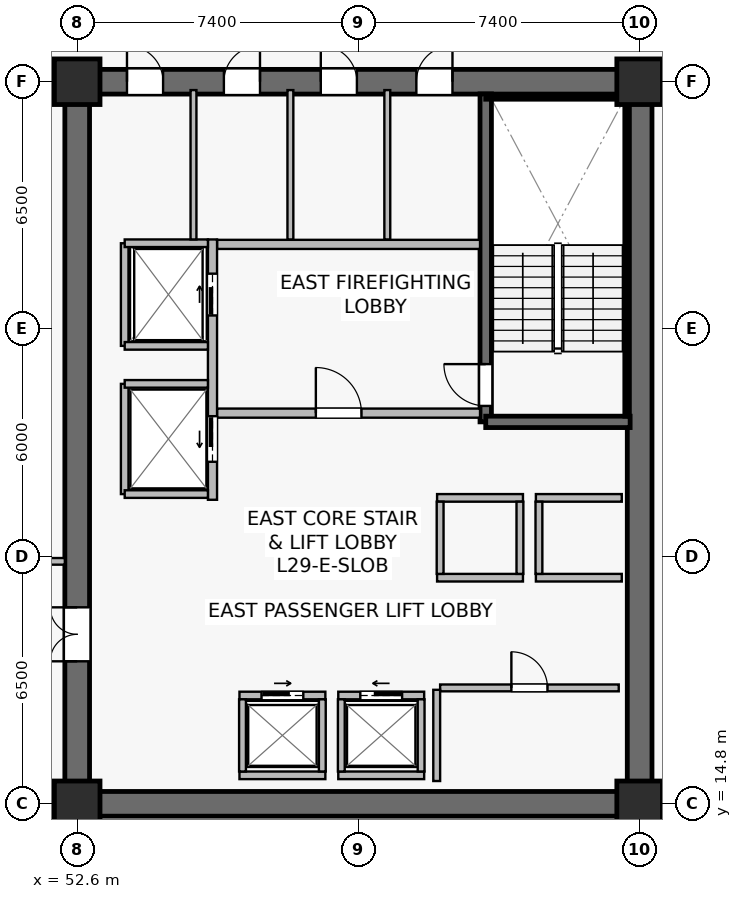
"""IFC4 building model, lengths in metres.
Left out: names, types, materials, properties, quantities, classifications, styles, units other than length and angle.
Written with IfcOpenShell. Run it as: python <this file> out.ifc"""

import sys

from ifc_helpers import new_model, si_unit, direction, frame, frame_2d, origin, origin_2d, place, context, subcontext, project, spatial, rectangle, extrude, source, transform, mapped, element, fill, save


model = new_model("IFC4")
c1 = context("Model", 3, precision=1e-05, world=origin(), true_north=direction((0.0, 1.0)))
c2 = subcontext(c1, "Body", "Model", "MODEL_VIEW")
j1 = project(units=[si_unit("LENGTHUNIT", "METRE"), si_unit("PLANEANGLEUNIT", "RADIAN")], contexts=[c1])
p1 = place(None, origin())
s1 = spatial("IfcSite", under=j1, at=p1, CompositionType="ELEMENT")
p2 = place(p1, origin())
s2 = spatial("IfcBuilding", under=s1, at=p2, CompositionType="ELEMENT")
p3 = place(p2, frame((0.0, 0.0, 121.5)))
s3 = spatial("IfcBuildingStorey", under=s2, at=p3, CompositionType="ELEMENT", Elevation=121.5)
p4 = place(p3, frame((52.275, 14.8, 0.0), z_axis=(0.0, 0.0, 1.0), x_axis=(1.0, 0.0, 0.0)))
e1 = element("IfcWall", 1, at=p4, inside=s3, PredefinedType="SHEAR", context=c2, shape_type="SweptSolid", body=[
    extrude(rectangle(XDim=15.45, YDim=0.65, at=frame_2d((7.725, 0.0))), origin(), (0.0, 0.0, 1.0), 3.79),
])
p5 = place(p3, frame((52.275, 33.8, 0.0), z_axis=(0.0, 0.0, 1.0), x_axis=(1.0, 0.0, 0.0)))
e2 = element("IfcWall", 2, at=p5, inside=s3, PredefinedType="SHEAR", context=c2, shape_type="SweptSolid", body=[
    extrude(rectangle(XDim=15.45, YDim=0.65, at=frame_2d((7.725, 0.0))), origin(), (0.0, 0.0, 1.0), 3.79),
])
p6 = place(p5, frame((9.25, 0.0, 0.0)))
e3 = element("IfcOpeningElement", 3, at=p6, cuts=e2, PredefinedType="OPENING", context=c2, shape_type="SweptSolid", body=[
    extrude(rectangle(XDim=0.95, YDim=2.15, at=frame_2d((0.475, 1.075))), frame((0.0, 0.335, 0.0), z_axis=(0.0, -1.0, 0.0), x_axis=(1.0, 0.0, 0.0)), (0.0, 0.0, 1.0), 0.67),
])
p7 = place(p5, frame((6.735, 0.0, 0.0)))
e4 = element("IfcOpeningElement", 4, at=p7, cuts=e2, PredefinedType="OPENING", context=c2, shape_type="SweptSolid", body=[
    extrude(rectangle(XDim=0.95, YDim=2.15, at=frame_2d((0.475, 1.075))), frame((0.0, 0.335, 0.0), z_axis=(0.0, -1.0, 0.0), x_axis=(1.0, 0.0, 0.0)), (0.0, 0.0, 1.0), 0.67),
])
p8 = place(p5, frame((4.185, 0.0, 0.0)))
e5 = element("IfcOpeningElement", 5, at=p8, cuts=e2, PredefinedType="OPENING", context=c2, shape_type="SweptSolid", body=[
    extrude(rectangle(XDim=0.95, YDim=2.15, at=frame_2d((0.475, 1.075))), frame((0.0, 0.335, 0.0), z_axis=(0.0, -1.0, 0.0), x_axis=(1.0, 0.0, 0.0)), (0.0, 0.0, 1.0), 0.67),
])
p9 = place(p5, frame((1.635, 0.0, 0.0)))
e6 = element("IfcOpeningElement", 6, at=p9, cuts=e2, PredefinedType="OPENING", context=c2, shape_type="SweptSolid", body=[
    extrude(rectangle(XDim=0.95, YDim=2.15, at=frame_2d((0.475, 1.075))), frame((0.0, 0.335, 0.0), z_axis=(0.0, -1.0, 0.0), x_axis=(1.0, 0.0, 0.0)), (0.0, 0.0, 1.0), 0.67),
])
p10 = place(p3, frame((52.6, 15.125, 0.0), z_axis=(0.0, 0.0, 1.0), x_axis=(0.0, 1.0, 0.0)))
e7 = element("IfcWall", 7, at=p10, inside=s3, PredefinedType="SHEAR", context=c2, shape_type="SweptSolid", body=[
    extrude(rectangle(XDim=18.35, YDim=0.65, at=frame_2d((9.175, 0.0))), origin(), (0.0, 0.0, 1.0), 3.79),
])
p11 = place(p10, frame((3.425, 0.0, 0.0)))
e8 = element("IfcOpeningElement", 8, at=p11, cuts=e7, PredefinedType="OPENING", context=c2, shape_type="SweptSolid", body=[
    extrude(rectangle(XDim=1.42, YDim=2.2, at=frame_2d((0.71, 1.1))), frame((0.0, 0.335, 0.0), z_axis=(0.0, -1.0, 0.0), x_axis=(1.0, 0.0, 0.0)), (0.0, 0.0, 1.0), 0.67),
])
p12 = place(p3, frame((67.4, 15.125, 0.0), z_axis=(0.0, 0.0, 1.0), x_axis=(0.0, 1.0, 0.0)))
e9 = element("IfcWall", 9, at=p12, inside=s3, PredefinedType="SHEAR", context=c2, shape_type="SweptSolid", body=[
    extrude(rectangle(XDim=18.35, YDim=0.65, at=frame_2d((9.175, 0.0))), origin(), (0.0, 0.0, 1.0), 3.79),
])
p13 = place(p3, frame((63.35, 24.85, 0.0), z_axis=(0.0, 0.0, 1.0), x_axis=(0.0, 1.0, 0.0)))
e10 = element("IfcWall", 10, at=p13, inside=s3, PredefinedType="SHEAR", context=c2, shape_type="SweptSolid", body=[
    extrude(rectangle(XDim=8.63, YDim=0.3, at=frame_2d((4.315, 0.0))), origin(), (0.0, 0.0, 1.0), 3.79),
])
p14 = place(p13, frame((0.42, 0.0, 0.0)))
e11 = element("IfcOpeningElement", 11, at=p14, cuts=e10, PredefinedType="OPENING", context=c2, shape_type="SweptSolid", body=[
    extrude(rectangle(XDim=1.1, YDim=2.15, at=frame_2d((0.55, 1.075))), frame((0.0, 0.16, 0.0), z_axis=(0.0, -1.0, 0.0), x_axis=(1.0, 0.0, 0.0)), (0.0, 0.0, 1.0), 0.32),
])
p15 = place(p3, frame((63.35, 24.85, 0.0), z_axis=(0.0, 0.0, 1.0), x_axis=(1.0, 0.0, 0.0)))
e12 = element("IfcWall", 12, at=p15, inside=s3, PredefinedType="SHEAR", context=c2, shape_type="SweptSolid", body=[
    extrude(rectangle(XDim=3.8, YDim=0.3, at=frame_2d((1.9, 0.0))), origin(), (0.0, 0.0, 1.0), 3.79),
])
p16 = place(p3, frame((63.35, 33.4, 0.0), z_axis=(0.0, 0.0, 1.0), x_axis=(1.0, 0.0, 0.0)))
e13 = element("IfcWall", 13, at=p16, inside=s3, PredefinedType="SOLIDWALL", context=c2, shape_type="SweptSolid", body=[
    extrude(rectangle(XDim=3.72, YDim=0.12, at=frame_2d((1.86, 0.0))), origin(), (0.0, 0.0, 1.0), 3.79),
])
p17 = place(p3, frame((67.07, 25.0, 0.0), z_axis=(0.0, 0.0, 1.0), x_axis=(0.0, 1.0, 0.0)))
e14 = element("IfcWall", 14, at=p17, inside=s3, PredefinedType="SOLIDWALL", context=c2, shape_type="SweptSolid", body=[
    extrude(rectangle(XDim=8.32, YDim=0.12, at=frame_2d((4.16, 0.0))), origin(), (0.0, 0.0, 1.0), 3.79),
])
m1 = source(origin(), c2, "Body", "SweptSolid", [
    extrude(rectangle(XDim=1.2, YDim=1.2, at=origin_2d()), origin(), (0.0, 0.0, 1.0), 4.1),
])
for number, where, z_axis, x_axis in (
    (15, (52.6, 14.8, 0.0), (0.0, 0.0, 1.0), (1.0, 0.0, 0.0)),
    (16, (67.4, 14.8, 0.0), (0.0, 0.0, 1.0), (1.0, 0.0, 0.0)),
    (17, (52.6, 33.8, 0.0), (0.0, 0.0, 1.0), (1.0, 0.0, 0.0)),
    (18, (67.4, 33.8, 0.0), (0.0, 0.0, 1.0), (1.0, 0.0, 0.0)),
):
    element("IfcColumn", number, at=place(p3, frame(where, z_axis=z_axis, x_axis=x_axis)), inside=s3, PredefinedType="COLUMN", context=c2, shape_type="MappedRepresentation", body=[
        mapped(m1, transform((0.0, 0.0, 0.0), scale=1.0)),
    ])
p18 = place(p3, frame((56.28, 25.08, 0.0), z_axis=(0.0, 0.0, 1.0), x_axis=(1.0, 0.0, 0.0)))
e19 = element("IfcWall", 19, at=p18, inside=s3, PredefinedType="SOLIDWALL", context=c2, shape_type="SweptSolid", body=[
    extrude(rectangle(XDim=6.92, YDim=0.24, at=frame_2d((3.46, 0.0))), origin(), (0.0, 0.0, 1.0), 3.125),
])
p19 = place(p18, frame((2.6, 0.0, 0.0)))
e20 = element("IfcOpeningElement", 20, at=p19, cuts=e19, PredefinedType="OPENING", context=c2, shape_type="SweptSolid", body=[
    extrude(rectangle(XDim=1.2, YDim=2.16, at=frame_2d((0.6, 1.08))), frame((0.0, 0.13, 0.0), z_axis=(0.0, -1.0, 0.0), x_axis=(1.0, 0.0, 0.0)), (0.0, 0.0, 1.0), 0.26),
])
p20 = place(p3, frame((56.28, 29.52, 0.0), z_axis=(0.0, 0.0, 1.0), x_axis=(1.0, 0.0, 0.0)))
e21 = element("IfcWall", 21, at=p20, inside=s3, PredefinedType="SOLIDWALL", context=c2, shape_type="SweptSolid", body=[
    extrude(rectangle(XDim=6.92, YDim=0.24, at=frame_2d((3.46, 0.0))), origin(), (0.0, 0.0, 1.0), 3.125),
])
p21 = place(p3, frame((56.16, 22.8, 0.0), z_axis=(0.0, 0.0, 1.0), x_axis=(0.0, 1.0, 0.0)))
e22 = element("IfcWall", 22, at=p21, inside=s3, PredefinedType="SOLIDWALL", context=c2, shape_type="SweptSolid", body=[
    extrude(rectangle(XDim=6.85, YDim=0.24, at=frame_2d((3.425, 0.0))), origin(), (0.0, 0.0, 1.0), 2.875),
])
p22 = place(p21, frame((4.85, 0.0, 0.0)))
e23 = element("IfcOpeningElement", 23, at=p22, cuts=e22, PredefinedType="OPENING", context=c2, shape_type="SweptSolid", body=[
    extrude(rectangle(XDim=1.1, YDim=2.22, at=frame_2d((0.55, 1.11))), frame((0.0, 0.13, 0.0), z_axis=(0.0, -1.0, 0.0), x_axis=(1.0, 0.0, 0.0)), (0.0, 0.0, 1.0), 0.26),
])
p23 = place(p21, frame((1.0, 0.0, 0.0)))
e24 = element("IfcOpeningElement", 24, at=p23, cuts=e22, PredefinedType="OPENING", context=c2, shape_type="SweptSolid", body=[
    extrude(rectangle(XDim=1.2, YDim=2.22, at=frame_2d((0.6, 1.11))), frame((0.0, 0.13, 0.0), z_axis=(0.0, -1.0, 0.0), x_axis=(1.0, 0.0, 0.0)), (0.0, 0.0, 1.0), 0.26),
])
p24 = place(p3, frame((59.47, 17.65, 0.0), z_axis=(0.0, 0.0, 1.0), x_axis=(1.0, 0.0, 0.0)))
e25 = element("IfcWall", 25, at=p24, inside=s3, PredefinedType="SOLIDWALL", context=c2, shape_type="SweptSolid", body=[
    extrude(rectangle(XDim=2.26, YDim=0.2, at=frame_2d((1.13, 0.0))), origin(), (0.0, 0.0, 1.0), 3.125),
])
p25 = place(p24, frame((0.58, 0.0, 0.0)))
e26 = element("IfcOpeningElement", 26, at=p25, cuts=e25, PredefinedType="OPENING", context=c2, shape_type="SweptSolid", body=[
    extrude(rectangle(XDim=1.1, YDim=2.22, at=frame_2d((0.55, 1.11))), frame((0.0, 0.11, 0.0), z_axis=(0.0, -1.0, 0.0), x_axis=(1.0, 0.0, 0.0)), (0.0, 0.0, 1.0), 0.22),
])
p26 = place(p3, frame((59.47, 15.55, 0.0), z_axis=(0.0, 0.0, 1.0), x_axis=(1.0, 0.0, 0.0)))
e27 = element("IfcWall", 27, at=p26, inside=s3, PredefinedType="SOLIDWALL", context=c2, shape_type="SweptSolid", body=[
    extrude(rectangle(XDim=2.26, YDim=0.2, at=frame_2d((1.13, 0.0))), origin(), (0.0, 0.0, 1.0), 3.125),
])
for number, where, z_axis, x_axis in (
    (28, (59.55, 15.65, 0.0), (0.0, 0.0, 1.0), (0.0, 1.0, 0.0)),
    (29, (61.65, 15.65, 0.0), (0.0, 0.0, 1.0), (0.0, 1.0, 0.0)),
):
    element("IfcWall", number, at=place(p3, frame(where, z_axis=z_axis, x_axis=x_axis)), inside=s3, PredefinedType="SOLIDWALL", context=c2, shape_type="SweptSolid", body=[
        extrude(rectangle(XDim=1.9, YDim=0.18, at=frame_2d((0.95, 0.0))), origin(), (0.0, 0.0, 1.0), 3.79),
    ])
p27 = place(p3, frame((56.87, 17.65, 0.0), z_axis=(0.0, 0.0, 1.0), x_axis=(1.0, 0.0, 0.0)))
e30 = element("IfcWall", 30, at=p27, inside=s3, PredefinedType="SOLIDWALL", context=c2, shape_type="SweptSolid", body=[
    extrude(rectangle(XDim=2.26, YDim=0.2, at=frame_2d((1.13, 0.0))), origin(), (0.0, 0.0, 1.0), 3.79),
])
p28 = place(p27, frame((0.58, 0.0, 0.0)))
e31 = element("IfcOpeningElement", 31, at=p28, cuts=e30, PredefinedType="OPENING", context=c2, shape_type="SweptSolid", body=[
    extrude(rectangle(XDim=1.1, YDim=2.22, at=frame_2d((0.55, 1.11))), frame((0.0, 0.11, 0.0), z_axis=(0.0, -1.0, 0.0), x_axis=(1.0, 0.0, 0.0)), (0.0, 0.0, 1.0), 0.22),
])
p29 = place(p3, frame((56.87, 15.55, 0.0), z_axis=(0.0, 0.0, 1.0), x_axis=(1.0, 0.0, 0.0)))
e32 = element("IfcWall", 32, at=p29, inside=s3, PredefinedType="SOLIDWALL", context=c2, shape_type="SweptSolid", body=[
    extrude(rectangle(XDim=2.26, YDim=0.2, at=frame_2d((1.13, 0.0))), origin(), (0.0, 0.0, 1.0), 3.79),
])
for number, where, z_axis, x_axis in (
    (33, (56.95, 15.65, 0.0), (0.0, 0.0, 1.0), (0.0, 1.0, 0.0)),
    (34, (59.05, 15.65, 0.0), (0.0, 0.0, 1.0), (0.0, 1.0, 0.0)),
):
    element("IfcWall", number, at=place(p3, frame(where, z_axis=z_axis, x_axis=x_axis)), inside=s3, PredefinedType="SOLIDWALL", context=c2, shape_type="SweptSolid", body=[
        extrude(rectangle(XDim=1.9, YDim=0.18, at=frame_2d((0.95, 0.0))), origin(), (0.0, 0.0, 1.0), 3.79),
    ])
for number, where, z_axis, x_axis in (
    (35, (64.67, 20.75, 0.0), (0.0, 0.0, 1.0), (1.0, 0.0, 0.0)),
    (36, (64.67, 22.85, 0.0), (0.0, 0.0, 1.0), (1.0, 0.0, 0.0)),
):
    element("IfcWall", number, at=place(p3, frame(where, z_axis=z_axis, x_axis=x_axis)), inside=s3, PredefinedType="SOLIDWALL", context=c2, shape_type="SweptSolid", body=[
        extrude(rectangle(XDim=2.26, YDim=0.2, at=frame_2d((1.13, 0.0))), origin(), (0.0, 0.0, 1.0), 3.79),
    ])
p30 = place(p3, frame((64.75, 20.85, 0.0), z_axis=(0.0, 0.0, 1.0), x_axis=(0.0, 1.0, 0.0)))
e37 = element("IfcWall", 37, at=p30, inside=s3, PredefinedType="SOLIDWALL", context=c2, shape_type="SweptSolid", body=[
    extrude(rectangle(XDim=1.9, YDim=0.18, at=frame_2d((0.95, 0.0))), origin(), (0.0, 0.0, 1.0), 3.79),
])
for number, where, z_axis, x_axis in (
    (38, (62.07, 20.75, 0.0), (0.0, 0.0, 1.0), (1.0, 0.0, 0.0)),
    (39, (62.07, 22.85, 0.0), (0.0, 0.0, 1.0), (1.0, 0.0, 0.0)),
):
    element("IfcWall", number, at=place(p3, frame(where, z_axis=z_axis, x_axis=x_axis)), inside=s3, PredefinedType="SOLIDWALL", context=c2, shape_type="SweptSolid", body=[
        extrude(rectangle(XDim=2.26, YDim=0.2, at=frame_2d((1.13, 0.0))), origin(), (0.0, 0.0, 1.0), 3.79),
    ])
for number, where, z_axis, x_axis in (
    (40, (62.15, 20.85, 0.0), (0.0, 0.0, 1.0), (0.0, 1.0, 0.0)),
    (41, (64.25, 20.85, 0.0), (0.0, 0.0, 1.0), (0.0, 1.0, 0.0)),
):
    element("IfcWall", number, at=place(p3, frame(where, z_axis=z_axis, x_axis=x_axis)), inside=s3, PredefinedType="SOLIDWALL", context=c2, shape_type="SweptSolid", body=[
        extrude(rectangle(XDim=1.9, YDim=0.18, at=frame_2d((0.95, 0.0))), origin(), (0.0, 0.0, 1.0), 3.79),
    ])
p31 = place(p3, frame((53.85, 26.85, 0.0), z_axis=(0.0, 0.0, 1.0), x_axis=(0.0, 1.0, 0.0)))
e42 = element("IfcWall", 42, at=p31, inside=s3, PredefinedType="SOLIDWALL", context=c2, shape_type="SweptSolid", body=[
    extrude(rectangle(XDim=2.7, YDim=0.2, at=frame_2d((1.35, 0.0))), origin(), (0.0, 0.0, 1.0), 3.79),
])
p32 = place(p3, frame((53.85, 29.55, 0.0), z_axis=(0.0, 0.0, 1.0), x_axis=(1.0, 0.0, 0.0)))
e43 = element("IfcWall", 43, at=p32, inside=s3, PredefinedType="SOLIDWALL", context=c2, shape_type="SweptSolid", body=[
    extrude(rectangle(XDim=2.19, YDim=0.2, at=frame_2d((1.095, 0.0))), origin(), (0.0, 0.0, 1.0), 3.79),
])
p33 = place(p3, frame((53.85, 26.85, 0.0), z_axis=(0.0, 0.0, 1.0), x_axis=(1.0, 0.0, 0.0)))
e44 = element("IfcWall", 44, at=p33, inside=s3, PredefinedType="SOLIDWALL", context=c2, shape_type="SweptSolid", body=[
    extrude(rectangle(XDim=2.19, YDim=0.2, at=frame_2d((1.095, 0.0))), origin(), (0.0, 0.0, 1.0), 3.187),
])
p34 = place(p3, frame((53.85, 22.95, 0.0), z_axis=(0.0, 0.0, 1.0), x_axis=(0.0, 1.0, 0.0)))
e45 = element("IfcWall", 45, at=p34, inside=s3, PredefinedType="SOLIDWALL", context=c2, shape_type="SweptSolid", body=[
    extrude(rectangle(XDim=2.9, YDim=0.2, at=frame_2d((1.45, 0.0))), origin(), (0.0, 0.0, 1.0), 2.875),
])
for number, where, z_axis, x_axis in (
    (46, (53.85, 25.85, 0.0), (0.0, 0.0, 1.0), (1.0, 0.0, 0.0)),
    (47, (53.85, 22.95, 0.0), (0.0, 0.0, 1.0), (1.0, 0.0, 0.0)),
):
    element("IfcWall", number, at=place(p3, frame(where, z_axis=z_axis, x_axis=x_axis)), inside=s3, PredefinedType="SOLIDWALL", context=c2, shape_type="SweptSolid", body=[
        extrude(rectangle(XDim=2.19, YDim=0.2, at=frame_2d((1.095, 0.0))), origin(), (0.0, 0.0, 1.0), 3.79),
    ])
p35 = place(p3, frame((62.15, 17.85, 0.0), z_axis=(0.0, 0.0, 1.0), x_axis=(1.0, 0.0, 0.0)))
e48 = element("IfcWall", 48, at=p35, inside=s3, PredefinedType="SOLIDWALL", context=c2, shape_type="SweptSolid", body=[
    extrude(rectangle(XDim=4.7, YDim=0.18, at=frame_2d((2.35, 0.0))), origin(), (0.0, 0.0, 1.0), 3.79),
])
p36 = place(p35, frame((1.875, 0.0, 0.0)))
e49 = element("IfcOpeningElement", 49, at=p36, cuts=e48, PredefinedType="OPENING", context=c2, shape_type="SweptSolid", body=[
    extrude(rectangle(XDim=0.95, YDim=2.15, at=frame_2d((0.475, 1.075))), frame((0.0, 0.1, 0.0), z_axis=(0.0, -1.0, 0.0), x_axis=(1.0, 0.0, 0.0)), (0.0, 0.0, 1.0), 0.2),
])
p37 = place(p3, frame((62.06, 15.4, 0.0), z_axis=(0.0, 0.0, 1.0), x_axis=(0.0, 1.0, 0.0)))
e50 = element("IfcWall", 50, at=p37, inside=s3, PredefinedType="SOLIDWALL", context=c2, shape_type="SweptSolid", body=[
    extrude(rectangle(XDim=2.4, YDim=0.18, at=frame_2d((1.2, 0.0))), origin(), (0.0, 0.0, 1.0), 3.79),
])
for number, where, z_axis, x_axis in (
    (51, (60.76, 29.65, 0.0), (0.0, 0.0, 1.0), (0.0, 1.0, 0.0)),
    (52, (58.21, 29.65, 0.0), (0.0, 0.0, 1.0), (0.0, 1.0, 0.0)),
    (53, (55.66, 29.65, 0.0), (0.0, 0.0, 1.0), (0.0, 1.0, 0.0)),
):
    element("IfcWall", number, at=place(p3, frame(where, z_axis=z_axis, x_axis=x_axis)), inside=s3, PredefinedType="PLUMBINGWALL", context=c2, shape_type="SweptSolid", body=[
        extrude(rectangle(XDim=3.93, YDim=0.155, at=frame_2d((1.965, 0.0))), origin(), (0.0, 0.0, 1.0), 3.79),
    ])
p38 = place(p3, frame((48.3, 34.26, 0.0), z_axis=(0.0, 0.0, 1.0), x_axis=(1.0, 0.0, 0.0)))
e54 = element("IfcWall", 54, at=p38, inside=s3, PredefinedType="PARTITIONING", context=c2, shape_type="SweptSolid", body=[
    extrude(rectangle(XDim=3.975, YDim=0.175, at=frame_2d((1.987, 0.0))), origin(), (0.0, 0.0, 1.0), 3.475),
])
p39 = place(p3, frame((48.3, 21.18, 0.0), z_axis=(0.0, 0.0, 1.0), x_axis=(1.0, 0.0, 0.0)))
e55 = element("IfcWall", 55, at=p39, inside=s3, PredefinedType="PARTITIONING", context=c2, shape_type="SweptSolid", body=[
    extrude(rectangle(XDim=3.975, YDim=0.175, at=frame_2d((1.987, 0.0))), origin(), (0.0, 0.0, 1.0), 3.79),
])
p40 = place(p39, frame((1.35, 0.0, 0.0)))
e56 = element("IfcOpeningElement", 56, at=p40, cuts=e55, PredefinedType="OPENING", context=c2, shape_type="SweptSolid", body=[
    extrude(rectangle(XDim=0.95, YDim=2.15, at=frame_2d((0.475, 1.075))), frame((0.0, 0.098, 0.0), z_axis=(0.0, -1.0, 0.0), x_axis=(1.0, 0.0, 0.0)), (0.0, 0.0, 1.0), 0.195),
])
m2 = source(origin(), c2, "Body", "SweptSolid", [
    extrude(rectangle(XDim=1.1, YDim=2.15, at=frame_2d((0.55, 1.075))), frame((0.0, 0.025, 0.0), z_axis=(0.0, -1.0, 0.0), x_axis=(1.0, 0.0, 0.0)), (0.0, 0.0, 1.0), 0.05),
])
p41 = place(p14, origin())
e57 = element("IfcDoor", 57, at=p41, inside=s3, OperationType="SINGLE_SWING_RIGHT", PredefinedType="DOOR", context=c2, shape_type="MappedRepresentation", body=[
    mapped(m2, transform((0.0, 0.0, 0.0), scale=1.0)),
])
fill(e11, e57)
m3 = source(origin(), c2, "Body", "SweptSolid", [
    extrude(rectangle(XDim=1.2, YDim=2.16, at=frame_2d((0.6, 1.08))), frame((0.0, 0.025, 0.0), z_axis=(0.0, -1.0, 0.0), x_axis=(1.0, 0.0, 0.0)), (0.0, 0.0, 1.0), 0.05),
])
p42 = place(p19, origin())
e58 = element("IfcDoor", 58, at=p42, inside=s3, OperationType="SINGLE_SWING_LEFT", PredefinedType="DOOR", context=c2, shape_type="MappedRepresentation", body=[
    mapped(m3, transform((0.0, 0.0, 0.0), scale=1.0)),
])
fill(e20, e58)
m4 = source(origin(), c2, "Body", "SweptSolid", [
    extrude(rectangle(XDim=1.1, YDim=2.22, at=frame_2d((0.55, 1.11))), frame((0.0, 0.025, 0.0), z_axis=(0.0, -1.0, 0.0), x_axis=(1.0, 0.0, 0.0)), (0.0, 0.0, 1.0), 0.05),
])
p43 = place(p25, origin())
e59 = element("IfcDoor", 59, at=p43, inside=s3, OperationType="SLIDING_TO_LEFT", PredefinedType="USERDEFINED", context=c2, shape_type="MappedRepresentation", body=[
    mapped(m4, transform((0.0, 0.0, 0.0), scale=1.0)),
])
fill(e26, e59)
p44 = place(p28, origin())
e60 = element("IfcDoor", 60, at=p44, inside=s3, OperationType="SLIDING_TO_RIGHT", PredefinedType="USERDEFINED", context=c2, shape_type="MappedRepresentation", body=[
    mapped(m4, transform((0.0, 0.0, 0.0), scale=1.0)),
])
fill(e31, e60)
p45 = place(p22, origin())
e61 = element("IfcDoor", 61, at=p45, inside=s3, OperationType="SLIDING_TO_RIGHT", PredefinedType="USERDEFINED", context=c2, shape_type="MappedRepresentation", body=[
    mapped(m4, transform((0.0, 0.0, 0.0), scale=1.0)),
])
fill(e23, e61)
m5 = source(origin(), c2, "Body", "SweptSolid", [
    extrude(rectangle(XDim=1.2, YDim=2.22, at=frame_2d((0.6, 1.11))), frame((0.0, 0.025, 0.0), z_axis=(0.0, -1.0, 0.0), x_axis=(1.0, 0.0, 0.0)), (0.0, 0.0, 1.0), 0.05),
])
p46 = place(p23, origin())
e62 = element("IfcDoor", 62, at=p46, inside=s3, OperationType="SLIDING_TO_LEFT", PredefinedType="USERDEFINED", context=c2, shape_type="MappedRepresentation", body=[
    mapped(m5, transform((0.0, 0.0, 0.0), scale=1.0)),
])
fill(e24, e62)
m6 = source(origin(), c2, "Body", "SweptSolid", [
    extrude(rectangle(XDim=0.95, YDim=2.15, at=frame_2d((0.475, 1.075))), frame((0.0, 0.025, 0.0), z_axis=(0.0, -1.0, 0.0), x_axis=(1.0, 0.0, 0.0)), (0.0, 0.0, 1.0), 0.05),
])
p47 = place(p36, origin())
e63 = element("IfcDoor", 63, at=p47, inside=s3, OperationType="SINGLE_SWING_LEFT", PredefinedType="DOOR", context=c2, shape_type="MappedRepresentation", body=[
    mapped(m6, transform((0.0, 0.0, 0.0), scale=1.0)),
])
fill(e49, e63)
m7 = source(origin(), c2, "Body", "SweptSolid", [
    extrude(rectangle(XDim=1.42, YDim=2.2, at=frame_2d((0.71, 1.1))), frame((0.0, 0.025, 0.0), z_axis=(0.0, -1.0, 0.0), x_axis=(1.0, 0.0, 0.0)), (0.0, 0.0, 1.0), 0.05),
])
p48 = place(p11, origin())
e64 = element("IfcDoor", 64, at=p48, inside=s3, OperationType="DOUBLE_DOOR_SINGLE_SWING", PredefinedType="DOOR", context=c2, shape_type="MappedRepresentation", body=[
    mapped(m7, transform((0.0, 0.0, 0.0), scale=1.0)),
])
fill(e8, e64)
p49 = place(p6, origin())
e65 = element("IfcDoor", 65, at=p49, inside=s3, OperationType="SINGLE_SWING_RIGHT", PredefinedType="DOOR", context=c2, shape_type="MappedRepresentation", body=[
    mapped(m6, transform((0.0, 0.0, 0.0), scale=1.0)),
])
fill(e3, e65)
p50 = place(p7, origin())
e66 = element("IfcDoor", 66, at=p50, inside=s3, OperationType="SINGLE_SWING_LEFT", PredefinedType="DOOR", context=c2, shape_type="MappedRepresentation", body=[
    mapped(m6, transform((0.0, 0.0, 0.0), scale=1.0)),
])
fill(e4, e66)
p51 = place(p8, origin())
e67 = element("IfcDoor", 67, at=p51, inside=s3, OperationType="SINGLE_SWING_RIGHT", PredefinedType="DOOR", context=c2, shape_type="MappedRepresentation", body=[
    mapped(m6, transform((0.0, 0.0, 0.0), scale=1.0)),
])
fill(e5, e67)
p52 = place(p9, origin())
e68 = element("IfcDoor", 68, at=p52, inside=s3, OperationType="SINGLE_SWING_LEFT", PredefinedType="DOOR", context=c2, shape_type="MappedRepresentation", body=[
    mapped(m6, transform((0.0, 0.0, 0.0), scale=1.0)),
])
fill(e6, e68)
save(model, sys.argv[1])
